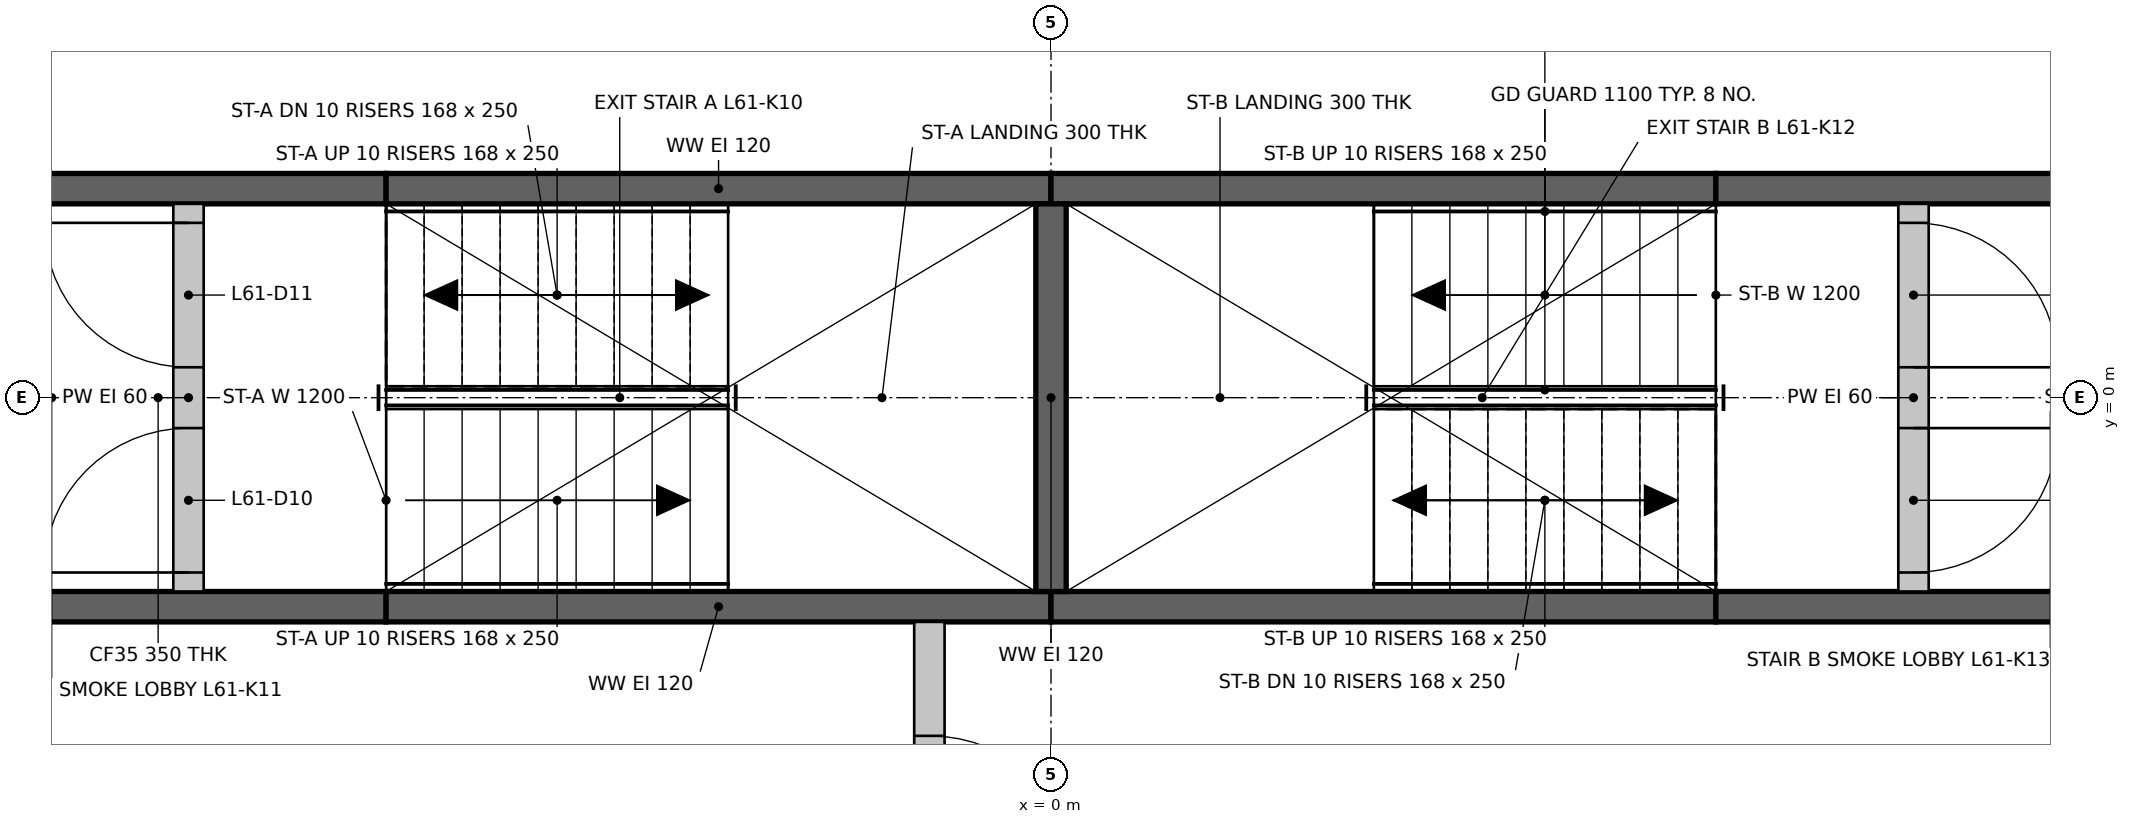
"""IFC4 building model, lengths in metres.
Left out: names, types, materials, properties, quantities, classifications, styles, units other than length and angle.
Written with IfcOpenShell. Run it as: python <this file> out.ifc"""

import sys

from ifc_helpers import new_model, si_unit, direction, frame, frame_2d, origin, place, context, subcontext, project, spatial, rectangle, extrude, element, fill, save


model = new_model("IFC4")
c1 = context("Model", 3, precision=1e-05, world=origin(), true_north=direction((0.0, 1.0)))
c2 = subcontext(c1, "Body", "Model", "MODEL_VIEW")
j1 = project(units=[si_unit("LENGTHUNIT", "METRE"), si_unit("PLANEANGLEUNIT", "RADIAN")], contexts=[c1])
p1 = place(None, origin())
s1 = spatial("IfcSite", under=j1, at=p1, CompositionType="ELEMENT")
p2 = place(p1, origin())
s2 = spatial("IfcBuilding", under=s1, at=p2, CompositionType="ELEMENT")
p3 = place(p2, frame((0.0, 0.0, 224.5)))
s3 = spatial("IfcBuildingStorey", under=s2, at=p3, CompositionType="ELEMENT", Elevation=224.5)
p4 = place(p3, frame((-7.374, -1.375, 0.0), z_axis=(0.0, 0.0, 1.0), x_axis=(1.0, 0.0, 0.0)))
e1 = element("IfcWall", 1, at=p4, inside=s3, PredefinedType="SHEAR", context=c2, shape_type="SweptSolid", body=[
    extrude(rectangle(XDim=3.0, YDim=0.2, at=frame_2d((1.5, 0.0))), origin(), (0.0, 0.0, 1.0), 3.0),
])
for number, where, z_axis, x_axis in (
    (2, (-4.374, -1.375, 0.0), (0.0, 0.0, 1.0), (1.0, 0.0, 0.0)),
    (3, (0.0, -1.375, 0.0), (0.0, 0.0, 1.0), (1.0, 0.0, 0.0)),
):
    element("IfcWall", number, at=place(p3, frame(where, z_axis=z_axis, x_axis=x_axis)), inside=s3, PredefinedType="SHEAR", context=c2, shape_type="SweptSolid", body=[
        extrude(rectangle(XDim=4.374, YDim=0.2, at=frame_2d((2.187, 0.0))), origin(), (0.0, 0.0, 1.0), 3.0),
    ])
for number, where, z_axis, x_axis in (
    (4, (4.374, -1.375, 0.0), (0.0, 0.0, 1.0), (1.0, 0.0, 0.0)),
    (5, (-7.374, 1.375, 0.0), (0.0, 0.0, 1.0), (1.0, 0.0, 0.0)),
):
    element("IfcWall", number, at=place(p3, frame(where, z_axis=z_axis, x_axis=x_axis)), inside=s3, PredefinedType="SHEAR", context=c2, shape_type="SweptSolid", body=[
        extrude(rectangle(XDim=3.0, YDim=0.2, at=frame_2d((1.5, 0.0))), origin(), (0.0, 0.0, 1.0), 3.0),
    ])
for number, where, z_axis, x_axis in (
    (6, (-4.374, 1.375, 0.0), (0.0, 0.0, 1.0), (1.0, 0.0, 0.0)),
    (7, (0.0, 1.375, 0.0), (0.0, 0.0, 1.0), (1.0, 0.0, 0.0)),
):
    element("IfcWall", number, at=place(p3, frame(where, z_axis=z_axis, x_axis=x_axis)), inside=s3, PredefinedType="SHEAR", context=c2, shape_type="SweptSolid", body=[
        extrude(rectangle(XDim=4.374, YDim=0.2, at=frame_2d((2.187, 0.0))), origin(), (0.0, 0.0, 1.0), 3.0),
    ])
p5 = place(p3, frame((4.374, 1.375, 0.0), z_axis=(0.0, 0.0, 1.0), x_axis=(1.0, 0.0, 0.0)))
e8 = element("IfcWall", 8, at=p5, inside=s3, PredefinedType="SHEAR", context=c2, shape_type="SweptSolid", body=[
    extrude(rectangle(XDim=3.0, YDim=0.2, at=frame_2d((1.5, 0.0))), origin(), (0.0, 0.0, 1.0), 3.0),
])
p6 = place(p3, frame((0.0, -1.275, 0.0), z_axis=(0.0, 0.0, 1.0), x_axis=(0.0, 1.0, 0.0)))
e9 = element("IfcWall", 9, at=p6, inside=s3, PredefinedType="SHEAR", context=c2, shape_type="SweptSolid", body=[
    extrude(rectangle(XDim=2.55, YDim=0.2, at=frame_2d((1.275, 0.0))), origin(), (0.0, 0.0, 1.0), 3.0),
])
p7 = place(p3, frame((-0.8, -3.974, 0.0), z_axis=(0.0, 0.0, 1.0), x_axis=(0.0, 1.0, 0.0)))
e10 = element("IfcWall", 10, at=p7, inside=s3, PredefinedType="PARTITIONING", context=c2, shape_type="SweptSolid", body=[
    extrude(rectangle(XDim=2.499, YDim=0.2, at=frame_2d((1.25, 0.0))), origin(), (0.0, 0.0, 1.0), 3.0),
])
p8 = place(p7, frame((0.75, 0.0, 0.0)))
e11 = element("IfcOpeningElement", 11, at=p8, cuts=e10, PredefinedType="OPENING", context=c2, shape_type="SweptSolid", body=[
    extrude(rectangle(XDim=1.0, YDim=2.1, at=frame_2d((0.5, 1.05))), frame((0.0, 0.11, 0.0), z_axis=(0.0, -1.0, 0.0), x_axis=(1.0, 0.0, 0.0)), (0.0, 0.0, 1.0), 0.22),
])
p9 = place(p3, frame((-5.674, -1.275, 0.0), z_axis=(0.0, 0.0, 1.0), x_axis=(0.0, 1.0, 0.0)))
e12 = element("IfcWall", 12, at=p9, inside=s3, PredefinedType="PARTITIONING", context=c2, shape_type="SweptSolid", body=[
    extrude(rectangle(XDim=2.55, YDim=0.2, at=frame_2d((1.275, 0.0))), origin(), (0.0, 0.0, 1.0), 3.0),
])
p10 = place(p9, frame((0.125, 0.0, 0.0)))
e13 = element("IfcOpeningElement", 13, at=p10, cuts=e12, PredefinedType="OPENING", context=c2, shape_type="SweptSolid", body=[
    extrude(rectangle(XDim=0.95, YDim=2.1, at=frame_2d((0.475, 1.05))), frame((0.0, 0.11, 0.0), z_axis=(0.0, -1.0, 0.0), x_axis=(1.0, 0.0, 0.0)), (0.0, 0.0, 1.0), 0.22),
])
p11 = place(p9, frame((1.475, 0.0, 0.0)))
e14 = element("IfcOpeningElement", 14, at=p11, cuts=e12, PredefinedType="OPENING", context=c2, shape_type="SweptSolid", body=[
    extrude(rectangle(XDim=0.95, YDim=2.1, at=frame_2d((0.475, 1.05))), frame((0.0, 0.11, 0.0), z_axis=(0.0, -1.0, 0.0), x_axis=(1.0, 0.0, 0.0)), (0.0, 0.0, 1.0), 0.22),
])
p12 = place(p3, frame((5.674, -1.275, 0.0), z_axis=(0.0, 0.0, 1.0), x_axis=(0.0, 1.0, 0.0)))
e15 = element("IfcWall", 15, at=p12, inside=s3, PredefinedType="PARTITIONING", context=c2, shape_type="SweptSolid", body=[
    extrude(rectangle(XDim=2.55, YDim=0.2, at=frame_2d((1.275, 0.0))), origin(), (0.0, 0.0, 1.0), 3.0),
])
p13 = place(p12, frame((0.125, 0.0, 0.0)))
e16 = element("IfcOpeningElement", 16, at=p13, cuts=e15, PredefinedType="OPENING", context=c2, shape_type="SweptSolid", body=[
    extrude(rectangle(XDim=0.95, YDim=2.1, at=frame_2d((0.475, 1.05))), frame((0.0, 0.11, 0.0), z_axis=(0.0, -1.0, 0.0), x_axis=(1.0, 0.0, 0.0)), (0.0, 0.0, 1.0), 0.22),
])
p14 = place(p12, frame((1.475, 0.0, 0.0)))
e17 = element("IfcOpeningElement", 17, at=p14, cuts=e15, PredefinedType="OPENING", context=c2, shape_type="SweptSolid", body=[
    extrude(rectangle(XDim=0.95, YDim=2.1, at=frame_2d((0.475, 1.05))), frame((0.0, 0.11, 0.0), z_axis=(0.0, -1.0, 0.0), x_axis=(1.0, 0.0, 0.0)), (0.0, 0.0, 1.0), 0.22),
])
p15 = place(p10, origin())
e18 = element("IfcDoor", 18, at=p15, inside=s3, OperationType="SINGLE_SWING_LEFT", PredefinedType="DOOR", context=c2, shape_type="SweptSolid", body=[
    extrude(rectangle(XDim=0.95, YDim=2.1, at=frame_2d((0.475, 1.05))), frame((0.0, 0.025, 0.0), z_axis=(0.0, -1.0, 0.0), x_axis=(1.0, 0.0, 0.0)), (0.0, 0.0, 1.0), 0.05),
])
fill(e13, e18)
p16 = place(p11, origin())
e19 = element("IfcDoor", 19, at=p16, inside=s3, OperationType="SINGLE_SWING_RIGHT", PredefinedType="DOOR", context=c2, shape_type="SweptSolid", body=[
    extrude(rectangle(XDim=0.95, YDim=2.1, at=frame_2d((0.475, 1.05))), frame((0.0, 0.025, 0.0), z_axis=(0.0, -1.0, 0.0), x_axis=(1.0, 0.0, 0.0)), (0.0, 0.0, 1.0), 0.05),
])
fill(e14, e19)
p17 = place(p13, frame((0.95, 0.0, 0.0), z_axis=(0.0, 0.0, 1.0), x_axis=(-1.0, 0.0, 0.0)))
e20 = element("IfcDoor", 20, at=p17, inside=s3, OperationType="SINGLE_SWING_RIGHT", PredefinedType="DOOR", context=c2, shape_type="SweptSolid", body=[
    extrude(rectangle(XDim=0.95, YDim=2.1, at=frame_2d((0.475, 1.05))), frame((0.0, 0.025, 0.0), z_axis=(0.0, -1.0, 0.0), x_axis=(1.0, 0.0, 0.0)), (0.0, 0.0, 1.0), 0.05),
])
fill(e16, e20)
p18 = place(p14, frame((0.95, 0.0, 0.0), z_axis=(0.0, 0.0, 1.0), x_axis=(-1.0, 0.0, 0.0)))
e21 = element("IfcDoor", 21, at=p18, inside=s3, OperationType="SINGLE_SWING_LEFT", PredefinedType="DOOR", context=c2, shape_type="SweptSolid", body=[
    extrude(rectangle(XDim=0.95, YDim=2.1, at=frame_2d((0.475, 1.05))), frame((0.0, 0.025, 0.0), z_axis=(0.0, -1.0, 0.0), x_axis=(1.0, 0.0, 0.0)), (0.0, 0.0, 1.0), 0.05),
])
fill(e17, e21)
p19 = place(p8, frame((1.0, 0.0, 0.0), z_axis=(0.0, 0.0, 1.0), x_axis=(-1.0, 0.0, 0.0)))
e22 = element("IfcDoor", 22, at=p19, inside=s3, OperationType="SINGLE_SWING_LEFT", PredefinedType="DOOR", context=c2, shape_type="SweptSolid", body=[
    extrude(rectangle(XDim=1.0, YDim=2.1, at=frame_2d((0.5, 1.05))), frame((0.0, 0.025, 0.0), z_axis=(0.0, -1.0, 0.0), x_axis=(1.0, 0.0, 0.0)), (0.0, 0.0, 1.0), 0.05),
])
fill(e11, e22)
save(model, sys.argv[1])
